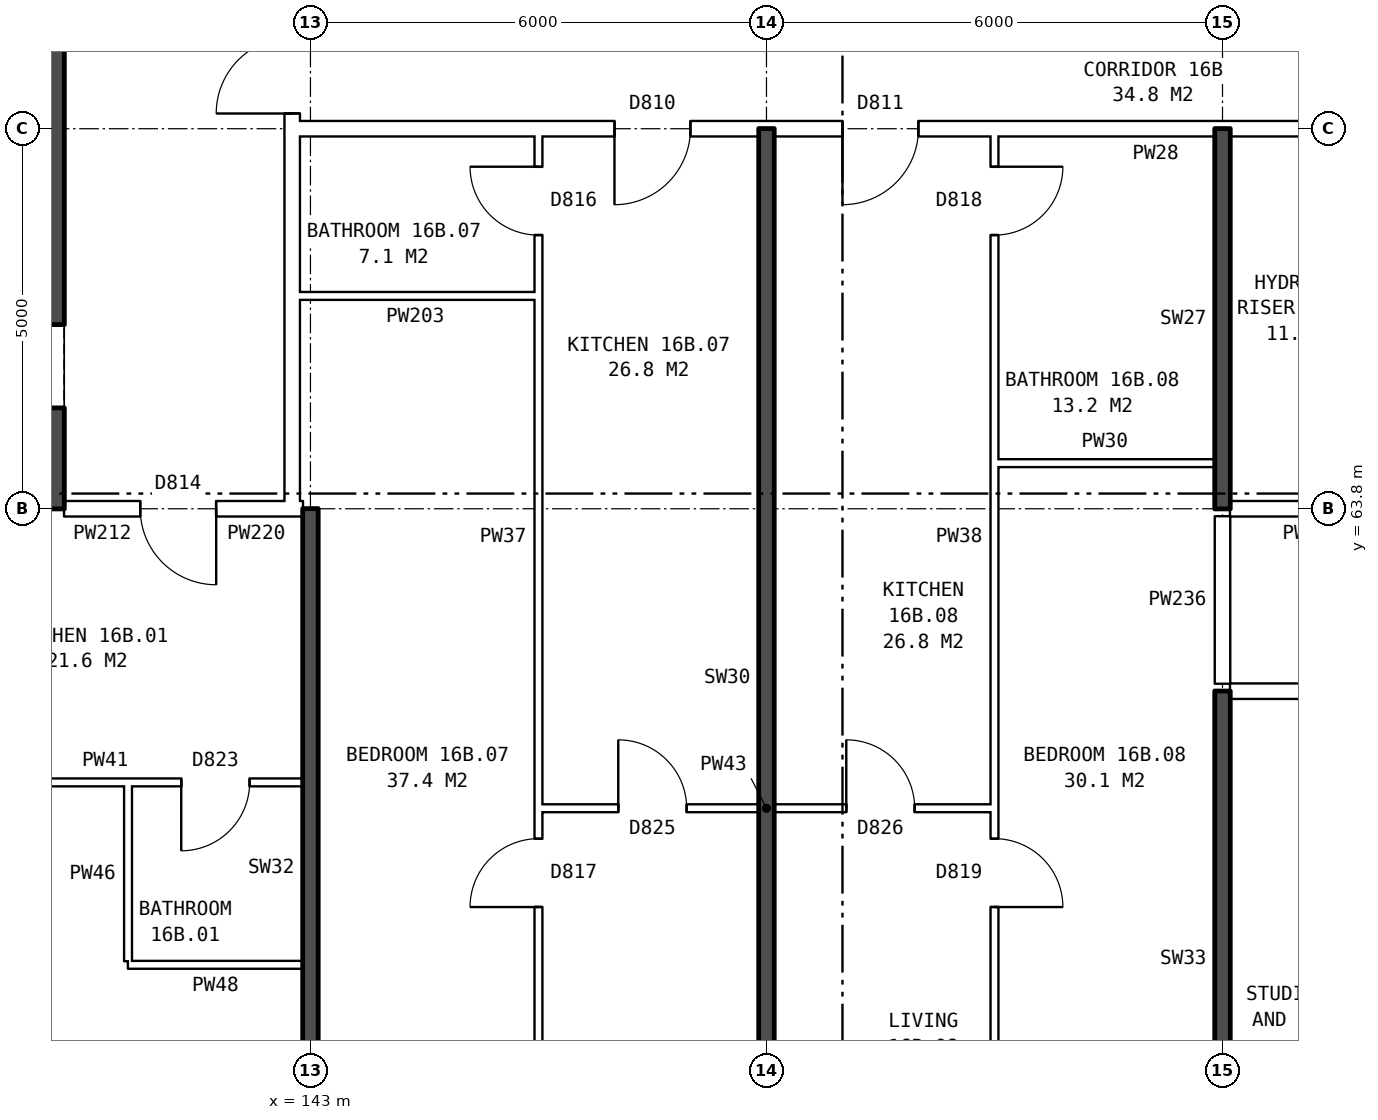
"""IFC4 building model, lengths in metres.
Left out: names, types, materials, properties, quantities, classifications, styles, units other than length and angle.
Written with IfcOpenShell. Run it as: python <this file> out.ifc"""

import sys

from ifc_helpers import new_model, si_unit, direction, frame, frame_2d, origin, place, context, subcontext, project, spatial, rectangle, extrude, element, fill, save


model = new_model("IFC4")
c1 = context("Model", 3, precision=1e-05, world=origin(), true_north=direction((0.0, 1.0)))
c2 = subcontext(c1, "Body", "Model", "MODEL_VIEW")
j1 = project(units=[si_unit("LENGTHUNIT", "METRE"), si_unit("PLANEANGLEUNIT", "RADIAN")], contexts=[c1])
p1 = place(None, origin())
s1 = spatial("IfcSite", under=j1, at=p1, CompositionType="ELEMENT")
p2 = place(p1, origin())
s2 = spatial("IfcBuilding", under=s1, at=p2, CompositionType="ELEMENT")
p3 = place(p2, frame((0.0, 0.0, 59.8)))
s3 = spatial("IfcBuildingStorey", under=s2, at=p3, CompositionType="ELEMENT", Elevation=59.8)
p4 = place(p3, frame((139.36, 64.6, 0.0), z_axis=(0.0, 0.0, 1.0), x_axis=(0.0, 1.0, 0.0)))
e1 = element("IfcWall", 1, at=p4, inside=s3, PredefinedType="SHEAR", context=c2, shape_type="SweptSolid", body=[
    extrude(rectangle(XDim=10.8, YDim=0.8, at=frame_2d((5.4, 0.0))), origin(), (0.0, 0.0, 1.0), 2.85),
])
p5 = place(p4, frame((0.525, 0.0, 0.0)))
e2 = element("IfcOpeningElement", 2, at=p5, cuts=e1, PredefinedType="OPENING", context=c2, shape_type="SweptSolid", body=[
    extrude(rectangle(XDim=1.1, YDim=2.1, at=frame_2d((0.55, 1.05))), frame((0.0, 0.41, 0.0), z_axis=(0.0, -1.0, 0.0), x_axis=(1.0, 0.0, 0.0)), (0.0, 0.0, 1.0), 0.82),
])
p6 = place(p4, frame((9.1, 0.0, 0.0)))
e3 = element("IfcOpeningElement", 3, at=p6, cuts=e1, PredefinedType="OPENING", context=c2, shape_type="SweptSolid", body=[
    extrude(rectangle(XDim=1.1, YDim=2.1, at=frame_2d((0.55, 1.05))), frame((0.0, 0.41, 0.0), z_axis=(0.0, -1.0, 0.0), x_axis=(1.0, 0.0, 0.0)), (0.0, 0.0, 1.0), 0.82),
])
p7 = place(p4, frame((7.325, 0.0, 0.0)))
e4 = element("IfcOpeningElement", 4, at=p7, cuts=e1, PredefinedType="OPENING", context=c2, shape_type="SweptSolid", body=[
    extrude(rectangle(XDim=0.85, YDim=2.1, at=frame_2d((0.425, 1.05))), frame((0.0, 0.41, 0.0), z_axis=(0.0, -1.0, 0.0), x_axis=(1.0, 0.0, 0.0)), (0.0, 0.0, 1.0), 0.82),
])
p8 = place(p3, frame((139.76, 64.2, 0.0), z_axis=(0.0, 0.0, 1.0), x_axis=(-1.0, 0.0, 0.0)))
e5 = element("IfcWall", 5, at=p8, inside=s3, PredefinedType="SHEAR", context=c2, shape_type="SweptSolid", body=[
    extrude(rectangle(XDim=8.4, YDim=0.8, at=frame_2d((4.2, 0.0))), origin(), (0.0, 0.0, 1.0), 2.85),
])
p9 = place(p3, frame((142.76, 63.9, 0.0), z_axis=(0.0, 0.0, 1.0), x_axis=(0.0, 1.0, 0.0)))
e6 = element("IfcWall", 6, at=p9, inside=s3, PredefinedType="PARTITIONING", context=c2, shape_type="SweptSolid", body=[
    extrude(rectangle(XDim=12.2, YDim=0.2, at=frame_2d((6.1, 0.0))), origin(), (0.0, 0.0, 1.0), 2.85),
])
p10 = place(p9, frame((5.1, 0.0, 0.0)))
e7 = element("IfcOpeningElement", 7, at=p10, cuts=e6, PredefinedType="OPENING", context=c2, shape_type="SweptSolid", body=[
    extrude(rectangle(XDim=2.0, YDim=2.1, at=frame_2d((1.0, 1.05))), frame((0.0, 0.11, 0.0), z_axis=(0.0, -1.0, 0.0), x_axis=(1.0, 0.0, 0.0)), (0.0, 0.0, 1.0), 0.22),
])
p11 = place(p3, frame((140.6, 57.8, 0.0), z_axis=(0.0, 0.0, 1.0), x_axis=(1.0, 0.0, 0.0)))
e8 = element("IfcWall", 8, at=p11, inside=s3, PredefinedType="PARTITIONING", context=c2, shape_type="SweptSolid", body=[
    extrude(rectangle(XDim=2.3, YDim=0.1, at=frame_2d((1.15, 0.0))), origin(), (0.0, 0.0, 1.0), 2.85),
])
p12 = place(p3, frame((146.0, 59.86, 0.0), z_axis=(0.0, 0.0, 1.0), x_axis=(1.0, 0.0, 0.0)))
e9 = element("IfcWall", 9, at=p12, inside=s3, PredefinedType="PARTITIONING", context=c2, shape_type="SweptSolid", body=[
    extrude(rectangle(XDim=6.0, YDim=0.1, at=frame_2d((3.0, 0.0))), origin(), (0.0, 0.0, 1.0), 2.85),
])
p13 = place(p12, frame((1.05, 0.0, 0.0)))
e10 = element("IfcOpeningElement", 10, at=p13, cuts=e9, PredefinedType="OPENING", context=c2, shape_type="SweptSolid", body=[
    extrude(rectangle(XDim=0.9, YDim=2.1, at=frame_2d((0.45, 1.05))), frame((0.0, 0.06, 0.0), z_axis=(0.0, -1.0, 0.0), x_axis=(1.0, 0.0, 0.0)), (0.0, 0.0, 1.0), 0.12),
])
p14 = place(p12, frame((4.05, 0.0, 0.0)))
e11 = element("IfcOpeningElement", 11, at=p14, cuts=e9, PredefinedType="OPENING", context=c2, shape_type="SweptSolid", body=[
    extrude(rectangle(XDim=0.9, YDim=2.1, at=frame_2d((0.45, 1.05))), frame((0.0, 0.06, 0.0), z_axis=(0.0, -1.0, 0.0), x_axis=(1.0, 0.0, 0.0)), (0.0, 0.0, 1.0), 0.12),
])
p15 = place(p3, frame((137.1, 60.2, 0.0), z_axis=(0.0, 0.0, 1.0), x_axis=(1.0, 0.0, 0.0)))
e12 = element("IfcWall", 12, at=p15, inside=s3, PredefinedType="PARTITIONING", context=c2, shape_type="SweptSolid", body=[
    extrude(rectangle(XDim=5.8, YDim=0.1, at=frame_2d((2.9, 0.0))), origin(), (0.0, 0.0, 1.0), 2.85),
])
p16 = place(p15, frame((1.3, 0.0, 0.0)))
e13 = element("IfcOpeningElement", 13, at=p16, cuts=e12, PredefinedType="OPENING", context=c2, shape_type="SweptSolid", body=[
    extrude(rectangle(XDim=0.9, YDim=2.1, at=frame_2d((0.45, 1.05))), frame((0.0, 0.06, 0.0), z_axis=(0.0, -1.0, 0.0), x_axis=(1.0, 0.0, 0.0)), (0.0, 0.0, 1.0), 0.12),
])
p17 = place(p15, frame((4.2, 0.0, 0.0)))
e14 = element("IfcOpeningElement", 14, at=p17, cuts=e12, PredefinedType="OPENING", context=c2, shape_type="SweptSolid", body=[
    extrude(rectangle(XDim=0.9, YDim=2.1, at=frame_2d((0.45, 1.05))), frame((0.0, 0.06, 0.0), z_axis=(0.0, -1.0, 0.0), x_axis=(1.0, 0.0, 0.0)), (0.0, 0.0, 1.0), 0.12),
])
p18 = place(p3, frame((155.1, 61.4, 0.0), z_axis=(0.0, 0.0, 1.0), x_axis=(1.0, 0.0, 0.0)))
e15 = element("IfcWall", 15, at=p18, inside=s3, PredefinedType="PARTITIONING", context=c2, shape_type="SweptSolid", body=[
    extrude(rectangle(XDim=21.04, YDim=0.2, at=frame_2d((10.52, 0.0))), origin(), (0.0, 0.0, 1.0), 2.85),
])
p19 = place(p18, frame((1.45, 0.0, 0.0)))
e16 = element("IfcOpeningElement", 16, at=p19, cuts=e15, PredefinedType="OPENING", context=c2, shape_type="SweptSolid", body=[
    extrude(rectangle(XDim=1.0, YDim=2.1, at=frame_2d((0.5, 1.05))), frame((0.0, 0.11, 0.0), z_axis=(0.0, -1.0, 0.0), x_axis=(1.0, 0.0, 0.0)), (0.0, 0.0, 1.0), 0.22),
])
p20 = place(p18, frame((7.4, 0.0, 0.0)))
e17 = element("IfcOpeningElement", 17, at=p20, cuts=e15, PredefinedType="OPENING", context=c2, shape_type="SweptSolid", body=[
    extrude(rectangle(XDim=1.0, YDim=2.1, at=frame_2d((0.5, 1.05))), frame((0.0, 0.11, 0.0), z_axis=(0.0, -1.0, 0.0), x_axis=(1.0, 0.0, 0.0)), (0.0, 0.0, 1.0), 0.22),
])
p21 = place(p18, frame((14.4, 0.0, 0.0)))
e18 = element("IfcOpeningElement", 18, at=p21, cuts=e15, PredefinedType="OPENING", context=c2, shape_type="SweptSolid", body=[
    extrude(rectangle(XDim=1.0, YDim=2.1, at=frame_2d((0.5, 1.05))), frame((0.0, 0.11, 0.0), z_axis=(0.0, -1.0, 0.0), x_axis=(1.0, 0.0, 0.0)), (0.0, 0.0, 1.0), 0.22),
])
p22 = place(p3, frame((139.76, 63.8, 0.0), z_axis=(0.0, 0.0, 1.0), x_axis=(1.0, 0.0, 0.0)))
e19 = element("IfcWall", 19, at=p22, inside=s3, PredefinedType="PARTITIONING", context=c2, shape_type="SweptSolid", body=[
    extrude(rectangle(XDim=3.0, YDim=0.2, at=frame_2d((1.5, 0.0))), origin(), (0.0, 0.0, 1.0), 2.85),
])
p23 = place(p22, frame((1.0, 0.0, 0.0)))
e20 = element("IfcOpeningElement", 20, at=p23, cuts=e19, PredefinedType="OPENING", context=c2, shape_type="SweptSolid", body=[
    extrude(rectangle(XDim=1.0, YDim=2.1, at=frame_2d((0.5, 1.05))), frame((0.0, 0.11, 0.0), z_axis=(0.0, -1.0, 0.0), x_axis=(1.0, 0.0, 0.0)), (0.0, 0.0, 1.0), 0.22),
])
p24 = place(p3, frame((142.76, 63.8, 0.0), z_axis=(0.0, 0.0, 1.0), x_axis=(1.0, 0.0, 0.0)))
e21 = element("IfcWall", 21, at=p24, inside=s3, PredefinedType="PARTITIONING", context=c2, shape_type="SweptSolid", body=[
    extrude(rectangle(XDim=0.14, YDim=0.2, at=frame_2d((0.07, 0.0))), origin(), (0.0, 0.0, 1.0), 2.85),
])
p25 = place(p3, frame((155.1, 63.8, 0.0), z_axis=(0.0, 0.0, 1.0), x_axis=(1.0, 0.0, 0.0)))
e22 = element("IfcWall", 22, at=p25, inside=s3, PredefinedType="PARTITIONING", context=c2, shape_type="SweptSolid", body=[
    extrude(rectangle(XDim=2.14, YDim=0.2, at=frame_2d((1.07, 0.0))), origin(), (0.0, 0.0, 1.0), 2.85),
])
p26 = place(p3, frame((152.0, 64.4, 0.0), z_axis=(0.0, 0.0, 1.0), x_axis=(1.0, 0.0, 0.0)))
e23 = element("IfcWall", 23, at=p26, inside=s3, PredefinedType="PARTITIONING", context=c2, shape_type="SweptSolid", body=[
    extrude(rectangle(XDim=2.9, YDim=0.1, at=frame_2d((1.45, 0.0))), origin(), (0.0, 0.0, 1.0), 2.85),
])
p27 = place(p3, frame((142.76, 66.6, 0.0), z_axis=(0.0, 0.0, 1.0), x_axis=(1.0, 0.0, 0.0)))
e24 = element("IfcWall", 24, at=p27, inside=s3, PredefinedType="PARTITIONING", context=c2, shape_type="SweptSolid", body=[
    extrude(rectangle(XDim=3.24, YDim=0.1, at=frame_2d((1.62, 0.0))), origin(), (0.0, 0.0, 1.0), 2.85),
])
p28 = place(p3, frame((142.76, 68.8, 0.0), z_axis=(0.0, 0.0, 1.0), x_axis=(1.0, 0.0, 0.0)))
e25 = element("IfcWall", 25, at=p28, inside=s3, PredefinedType="PARTITIONING", context=c2, shape_type="SweptSolid", body=[
    extrude(rectangle(XDim=14.48, YDim=0.2, at=frame_2d((7.24, 0.0))), origin(), (0.0, 0.0, 1.0), 2.85),
])
p29 = place(p28, frame((4.24, 0.0, 0.0)))
e26 = element("IfcOpeningElement", 26, at=p29, cuts=e25, PredefinedType="OPENING", context=c2, shape_type="SweptSolid", body=[
    extrude(rectangle(XDim=1.0, YDim=2.1, at=frame_2d((0.5, 1.05))), frame((0.0, 0.11, 0.0), z_axis=(0.0, -1.0, 0.0), x_axis=(1.0, 0.0, 0.0)), (0.0, 0.0, 1.0), 0.22),
])
p30 = place(p28, frame((7.24, 0.0, 0.0)))
e27 = element("IfcOpeningElement", 27, at=p30, cuts=e25, PredefinedType="OPENING", context=c2, shape_type="SweptSolid", body=[
    extrude(rectangle(XDim=1.0, YDim=2.1, at=frame_2d((0.5, 1.05))), frame((0.0, 0.11, 0.0), z_axis=(0.0, -1.0, 0.0), x_axis=(1.0, 0.0, 0.0)), (0.0, 0.0, 1.0), 0.22),
])
p31 = place(p3, frame((140.6, 57.85, 0.0), z_axis=(0.0, 0.0, 1.0), x_axis=(0.0, 1.0, 0.0)))
e28 = element("IfcWall", 28, at=p31, inside=s3, PredefinedType="PARTITIONING", context=c2, shape_type="SweptSolid", body=[
    extrude(rectangle(XDim=2.3, YDim=0.1, at=frame_2d((1.15, 0.0))), origin(), (0.0, 0.0, 1.0), 2.85),
])
p32 = place(p3, frame((143.0, 54.36, 0.0), z_axis=(0.0, 0.0, 1.0), x_axis=(0.0, 1.0, 0.0)))
e29 = element("IfcWall", 29, at=p32, inside=s3, PredefinedType="SOLIDWALL", context=c2, shape_type="SweptSolid", body=[
    extrude(rectangle(XDim=9.44, YDim=0.2, at=frame_2d((4.72, 0.0))), origin(), (0.0, 0.0, 1.0), 2.85),
])
p33 = place(p3, frame((146.0, 54.36, 0.0), z_axis=(0.0, 0.0, 1.0), x_axis=(0.0, 1.0, 0.0)))
e30 = element("IfcWall", 30, at=p33, inside=s3, PredefinedType="PARTITIONING", context=c2, shape_type="SweptSolid", body=[
    extrude(rectangle(XDim=14.34, YDim=0.1, at=frame_2d((7.17, 0.0))), origin(), (0.0, 0.0, 1.0), 2.85),
])
p34 = place(p33, frame((4.2, 0.0, 0.0)))
e31 = element("IfcOpeningElement", 31, at=p34, cuts=e30, PredefinedType="OPENING", context=c2, shape_type="SweptSolid", body=[
    extrude(rectangle(XDim=0.9, YDim=2.1, at=frame_2d((0.45, 1.05))), frame((0.0, 0.06, 0.0), z_axis=(0.0, -1.0, 0.0), x_axis=(1.0, 0.0, 0.0)), (0.0, 0.0, 1.0), 0.12),
])
p35 = place(p33, frame((13.04, 0.0, 0.0)))
e32 = element("IfcOpeningElement", 32, at=p35, cuts=e30, PredefinedType="OPENING", context=c2, shape_type="SweptSolid", body=[
    extrude(rectangle(XDim=0.9, YDim=2.1, at=frame_2d((0.45, 1.05))), frame((0.0, 0.06, 0.0), z_axis=(0.0, -1.0, 0.0), x_axis=(1.0, 0.0, 0.0)), (0.0, 0.0, 1.0), 0.12),
])
p36 = place(p3, frame((149.0, 54.36, 0.0), z_axis=(0.0, 0.0, 1.0), x_axis=(0.0, 1.0, 0.0)))
e33 = element("IfcWall", 33, at=p36, inside=s3, PredefinedType="SOLIDWALL", context=c2, shape_type="SweptSolid", body=[
    extrude(rectangle(XDim=14.44, YDim=0.2, at=frame_2d((7.22, 0.0))), origin(), (0.0, 0.0, 1.0), 2.85),
])
p37 = place(p3, frame((152.0, 54.36, 0.0), z_axis=(0.0, 0.0, 1.0), x_axis=(0.0, 1.0, 0.0)))
e34 = element("IfcWall", 34, at=p37, inside=s3, PredefinedType="PARTITIONING", context=c2, shape_type="SweptSolid", body=[
    extrude(rectangle(XDim=14.34, YDim=0.1, at=frame_2d((7.17, 0.0))), origin(), (0.0, 0.0, 1.0), 2.85),
])
p38 = place(p37, frame((4.2, 0.0, 0.0)))
e35 = element("IfcOpeningElement", 35, at=p38, cuts=e34, PredefinedType="OPENING", context=c2, shape_type="SweptSolid", body=[
    extrude(rectangle(XDim=0.9, YDim=2.1, at=frame_2d((0.45, 1.05))), frame((0.0, 0.06, 0.0), z_axis=(0.0, -1.0, 0.0), x_axis=(1.0, 0.0, 0.0)), (0.0, 0.0, 1.0), 0.12),
])
p39 = place(p37, frame((13.04, 0.0, 0.0)))
e36 = element("IfcOpeningElement", 36, at=p39, cuts=e34, PredefinedType="OPENING", context=c2, shape_type="SweptSolid", body=[
    extrude(rectangle(XDim=0.9, YDim=2.1, at=frame_2d((0.45, 1.05))), frame((0.0, 0.06, 0.0), z_axis=(0.0, -1.0, 0.0), x_axis=(1.0, 0.0, 0.0)), (0.0, 0.0, 1.0), 0.12),
])
p40 = place(p3, frame((155.0, 54.36, 0.0), z_axis=(0.0, 0.0, 1.0), x_axis=(0.0, 1.0, 0.0)))
e37 = element("IfcWall", 37, at=p40, inside=s3, PredefinedType="SOLIDWALL", context=c2, shape_type="SweptSolid", body=[
    extrude(rectangle(XDim=7.04, YDim=0.2, at=frame_2d((3.52, 0.0))), origin(), (0.0, 0.0, 1.0), 2.85),
])
p41 = place(p3, frame((155.0, 61.5, 0.0), z_axis=(0.0, 0.0, 1.0), x_axis=(0.0, 1.0, 0.0)))
e38 = element("IfcWall", 38, at=p41, inside=s3, PredefinedType="PARTITIONING", context=c2, shape_type="SweptSolid", body=[
    extrude(rectangle(XDim=2.2, YDim=0.2, at=frame_2d((1.1, 0.0))), origin(), (0.0, 0.0, 1.0), 2.85),
])
p42 = place(p3, frame((155.0, 63.8, 0.0), z_axis=(0.0, 0.0, 1.0), x_axis=(0.0, 1.0, 0.0)))
e39 = element("IfcWall", 39, at=p42, inside=s3, PredefinedType="SOLIDWALL", context=c2, shape_type="SweptSolid", body=[
    extrude(rectangle(XDim=5.0, YDim=0.2, at=frame_2d((2.5, 0.0))), origin(), (0.0, 0.0, 1.0), 2.85),
])
p43 = place(p10, origin())
e40 = element("IfcDoor", 40, at=p43, inside=s3, OperationType="DOUBLE_DOOR_SINGLE_SWING", PredefinedType="DOOR", context=c2, shape_type="SweptSolid", body=[
    extrude(rectangle(XDim=2.0, YDim=2.1, at=frame_2d((1.0, 1.05))), frame((0.0, 0.025, 0.0), z_axis=(0.0, -1.0, 0.0), x_axis=(1.0, 0.0, 0.0)), (0.0, 0.0, 1.0), 0.05),
])
fill(e7, e40)
p44 = place(p23, frame((1.0, 0.0, 0.0), z_axis=(0.0, 0.0, 1.0), x_axis=(-1.0, 0.0, 0.0)))
e41 = element("IfcDoor", 41, at=p44, inside=s3, OperationType="SINGLE_SWING_LEFT", PredefinedType="DOOR", context=c2, shape_type="SweptSolid", body=[
    extrude(rectangle(XDim=1.0, YDim=2.1, at=frame_2d((0.5, 1.05))), frame((0.0, 0.025, 0.0), z_axis=(0.0, -1.0, 0.0), x_axis=(1.0, 0.0, 0.0)), (0.0, 0.0, 1.0), 0.05),
])
fill(e20, e41)
p45 = place(p17, frame((0.9, 0.0, 0.0), z_axis=(0.0, 0.0, 1.0), x_axis=(-1.0, 0.0, 0.0)))
e42 = element("IfcDoor", 42, at=p45, inside=s3, OperationType="SINGLE_SWING_RIGHT", PredefinedType="DOOR", context=c2, shape_type="SweptSolid", body=[
    extrude(rectangle(XDim=0.9, YDim=2.1, at=frame_2d((0.45, 1.05))), frame((0.0, 0.025, 0.0), z_axis=(0.0, -1.0, 0.0), x_axis=(1.0, 0.0, 0.0)), (0.0, 0.0, 1.0), 0.05),
])
fill(e14, e42)
p46 = place(p34, origin())
e43 = element("IfcDoor", 43, at=p46, inside=s3, OperationType="SINGLE_SWING_LEFT", PredefinedType="DOOR", context=c2, shape_type="SweptSolid", body=[
    extrude(rectangle(XDim=0.9, YDim=2.1, at=frame_2d((0.45, 1.05))), frame((0.0, 0.025, 0.0), z_axis=(0.0, -1.0, 0.0), x_axis=(1.0, 0.0, 0.0)), (0.0, 0.0, 1.0), 0.05),
])
fill(e31, e43)
p47 = place(p29, frame((1.0, 0.0, 0.0), z_axis=(0.0, 0.0, 1.0), x_axis=(-1.0, 0.0, 0.0)))
e44 = element("IfcDoor", 44, at=p47, inside=s3, OperationType="SINGLE_SWING_RIGHT", PredefinedType="DOOR", context=c2, shape_type="SweptSolid", body=[
    extrude(rectangle(XDim=1.0, YDim=2.1, at=frame_2d((0.5, 1.05))), frame((0.0, 0.025, 0.0), z_axis=(0.0, -1.0, 0.0), x_axis=(1.0, 0.0, 0.0)), (0.0, 0.0, 1.0), 0.05),
])
fill(e26, e44)
p48 = place(p13, origin())
e45 = element("IfcDoor", 45, at=p48, inside=s3, OperationType="SINGLE_SWING_LEFT", PredefinedType="DOOR", context=c2, shape_type="SweptSolid", body=[
    extrude(rectangle(XDim=0.9, YDim=2.1, at=frame_2d((0.45, 1.05))), frame((0.0, 0.025, 0.0), z_axis=(0.0, -1.0, 0.0), x_axis=(1.0, 0.0, 0.0)), (0.0, 0.0, 1.0), 0.05),
])
fill(e10, e45)
p49 = place(p35, origin())
e46 = element("IfcDoor", 46, at=p49, inside=s3, OperationType="SINGLE_SWING_RIGHT", PredefinedType="DOOR", context=c2, shape_type="SweptSolid", body=[
    extrude(rectangle(XDim=0.9, YDim=2.1, at=frame_2d((0.45, 1.05))), frame((0.0, 0.025, 0.0), z_axis=(0.0, -1.0, 0.0), x_axis=(1.0, 0.0, 0.0)), (0.0, 0.0, 1.0), 0.05),
])
fill(e32, e46)
p50 = place(p38, frame((0.9, 0.0, 0.0), z_axis=(0.0, 0.0, 1.0), x_axis=(-1.0, 0.0, 0.0)))
e47 = element("IfcDoor", 47, at=p50, inside=s3, OperationType="SINGLE_SWING_RIGHT", PredefinedType="DOOR", context=c2, shape_type="SweptSolid", body=[
    extrude(rectangle(XDim=0.9, YDim=2.1, at=frame_2d((0.45, 1.05))), frame((0.0, 0.025, 0.0), z_axis=(0.0, -1.0, 0.0), x_axis=(1.0, 0.0, 0.0)), (0.0, 0.0, 1.0), 0.05),
])
fill(e35, e47)
p51 = place(p30, frame((1.0, 0.0, 0.0), z_axis=(0.0, 0.0, 1.0), x_axis=(-1.0, 0.0, 0.0)))
e48 = element("IfcDoor", 48, at=p51, inside=s3, OperationType="SINGLE_SWING_RIGHT", PredefinedType="DOOR", context=c2, shape_type="SweptSolid", body=[
    extrude(rectangle(XDim=1.0, YDim=2.1, at=frame_2d((0.5, 1.05))), frame((0.0, 0.025, 0.0), z_axis=(0.0, -1.0, 0.0), x_axis=(1.0, 0.0, 0.0)), (0.0, 0.0, 1.0), 0.05),
])
fill(e27, e48)
p52 = place(p14, origin())
e49 = element("IfcDoor", 49, at=p52, inside=s3, OperationType="SINGLE_SWING_LEFT", PredefinedType="DOOR", context=c2, shape_type="SweptSolid", body=[
    extrude(rectangle(XDim=0.9, YDim=2.1, at=frame_2d((0.45, 1.05))), frame((0.0, 0.025, 0.0), z_axis=(0.0, -1.0, 0.0), x_axis=(1.0, 0.0, 0.0)), (0.0, 0.0, 1.0), 0.05),
])
fill(e11, e49)
p53 = place(p39, frame((0.9, 0.0, 0.0), z_axis=(0.0, 0.0, 1.0), x_axis=(-1.0, 0.0, 0.0)))
e50 = element("IfcDoor", 50, at=p53, inside=s3, OperationType="SINGLE_SWING_LEFT", PredefinedType="DOOR", context=c2, shape_type="SweptSolid", body=[
    extrude(rectangle(XDim=0.9, YDim=2.1, at=frame_2d((0.45, 1.05))), frame((0.0, 0.025, 0.0), z_axis=(0.0, -1.0, 0.0), x_axis=(1.0, 0.0, 0.0)), (0.0, 0.0, 1.0), 0.05),
])
fill(e36, e50)
save(model, sys.argv[1])
